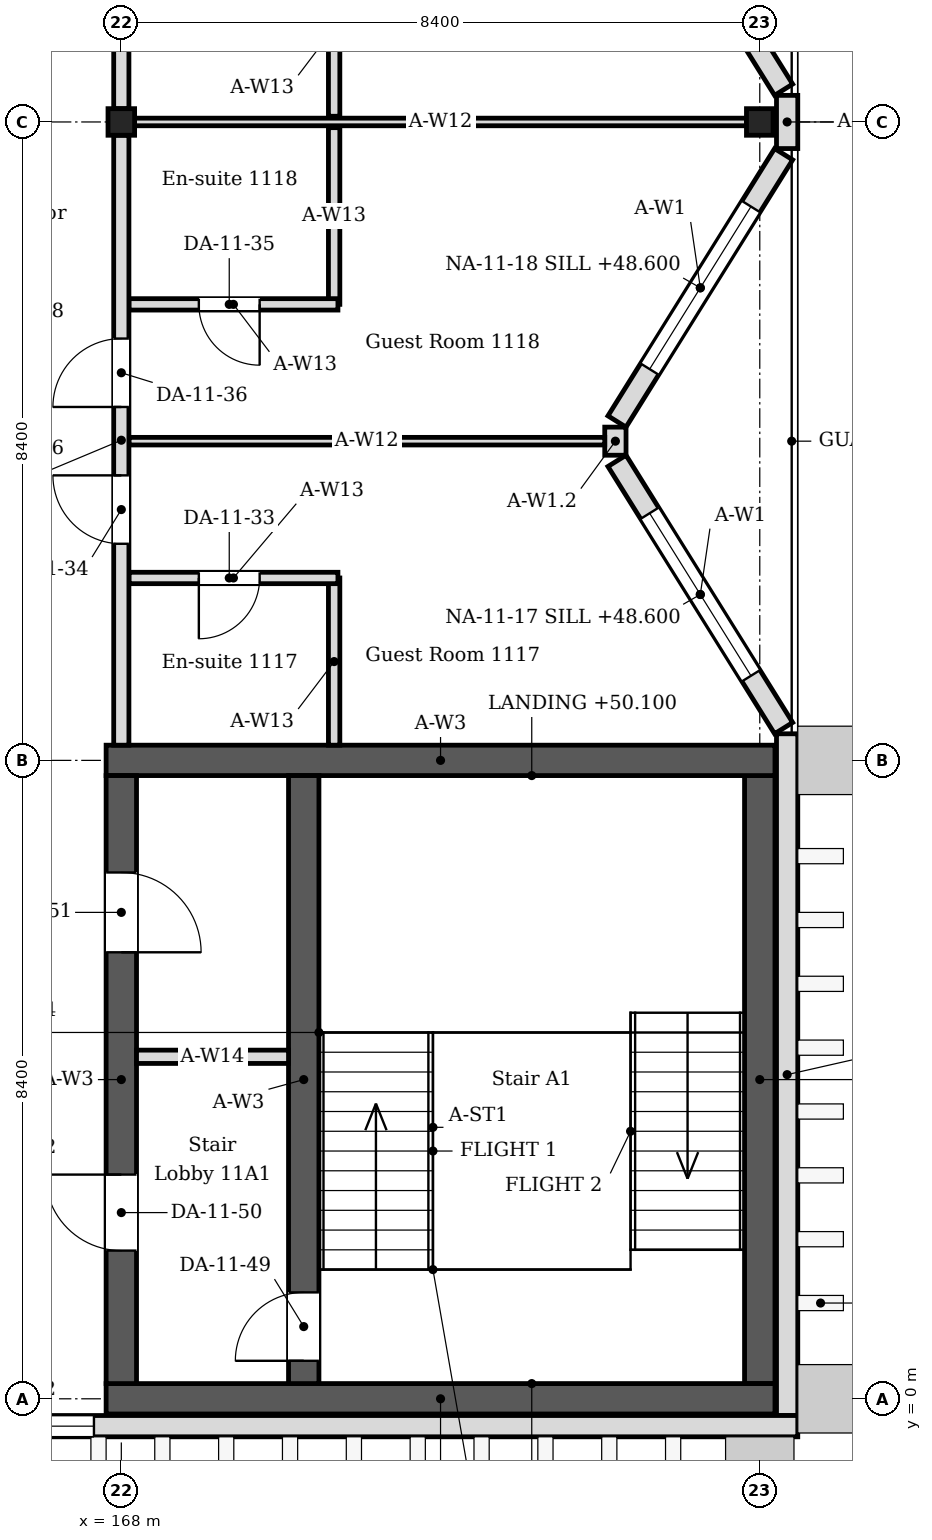
"""IFC4 building model, lengths in metres.
Left out: names, types, materials, properties, quantities, classifications, styles, units other than length and angle.
Written with IfcOpenShell. Run it as: python <this file> out.ifc"""

import sys

from ifc_helpers import new_model, si_unit, direction, frame, frame_2d, origin, origin_2d, place, context, subcontext, project, spatial, rectangle, i_section, extrude, element, fill, save


model = new_model("IFC4")
c1 = context("Model", 3, precision=1e-05, world=origin(), true_north=direction((0.0, 1.0)))
c2 = subcontext(c1, "Body", "Model", "MODEL_VIEW")
j1 = project(units=[si_unit("LENGTHUNIT", "METRE"), si_unit("PLANEANGLEUNIT", "RADIAN")], contexts=[c1])
p1 = place(None, origin())
s1 = spatial("IfcSite", under=j1, at=p1, CompositionType="ELEMENT")
p2 = place(p1, origin())
s2 = spatial("IfcBuilding", under=s1, at=p2, CompositionType="ELEMENT")
p3 = place(p2, frame((0.0, 0.0, 48.0)))
s3 = spatial("IfcBuildingStorey", under=s2, at=p3, CompositionType="ELEMENT", Elevation=48.0)
for number, where, z_axis, x_axis in (
    (1, (168.0, 16.8, 0.0), (0.0, 0.0, 1.0), (1.0, 0.0, 0.0)),
    (2, (176.4, 16.8, 0.0), (0.0, 0.0, 1.0), (1.0, 0.0, 0.0)),
):
    element("IfcColumn", number, at=place(p3, frame(where, z_axis=z_axis, x_axis=x_axis)), inside=s3, PredefinedType="COLUMN", context=c2, shape_type="SweptSolid", body=[
        extrude(i_section(OverallWidth=0.35, OverallDepth=0.35, WebThickness=0.012, FlangeThickness=0.019, FilletRadius=0.013, at=origin_2d()), origin(), (0.0, 0.0, 1.0), 4.2),
    ])
for number, where, z_axis, x_axis in (
    (3, (167.8, 0.0, 0.0), (0.0, 0.0, 1.0), (1.0, 0.0, 0.0)),
    (4, (167.8, 8.4, 0.0), (0.0, 0.0, 1.0), (1.0, 0.0, 0.0)),
):
    element("IfcWall", number, at=place(p3, frame(where, z_axis=z_axis, x_axis=x_axis)), inside=s3, PredefinedType="SOLIDWALL", context=c2, shape_type="SweptSolid", body=[
        extrude(rectangle(XDim=8.8, YDim=0.4, at=frame_2d((4.4, 0.0))), origin(), (0.0, 0.0, 1.0), 4.05),
    ])
p4 = place(p3, frame((168.0, 0.2, 0.0), z_axis=(0.0, 0.0, 1.0), x_axis=(0.0, 1.0, 0.0)))
e5 = element("IfcWall", 5, at=p4, inside=s3, PredefinedType="SOLIDWALL", context=c2, shape_type="SweptSolid", body=[
    extrude(rectangle(XDim=8.0, YDim=0.4, at=frame_2d((4.0, 0.0))), origin(), (0.0, 0.0, 1.0), 4.05),
])
p5 = place(p4, frame((1.75, 0.0, 0.0)))
e6 = element("IfcOpeningElement", 6, at=p5, cuts=e5, PredefinedType="OPENING", context=c2, shape_type="SweptSolid", body=[
    extrude(rectangle(XDim=1.0, YDim=2.1, at=frame_2d((0.5, 1.05))), frame((0.0, 0.21, 0.0), z_axis=(0.0, -1.0, 0.0), x_axis=(1.0, 0.0, 0.0)), (0.0, 0.0, 1.0), 0.42),
])
p6 = place(p4, frame((5.675, 0.0, 0.0)))
e7 = element("IfcOpeningElement", 7, at=p6, cuts=e5, PredefinedType="OPENING", context=c2, shape_type="SweptSolid", body=[
    extrude(rectangle(XDim=1.05, YDim=2.1, at=frame_2d((0.525, 1.05))), frame((0.0, 0.21, 0.0), z_axis=(0.0, -1.0, 0.0), x_axis=(1.0, 0.0, 0.0)), (0.0, 0.0, 1.0), 0.42),
])
p7 = place(p3, frame((176.4, 0.2, 0.0), z_axis=(0.0, 0.0, 1.0), x_axis=(0.0, 1.0, 0.0)))
e8 = element("IfcWall", 8, at=p7, inside=s3, PredefinedType="SOLIDWALL", context=c2, shape_type="SweptSolid", body=[
    extrude(rectangle(XDim=8.0, YDim=0.4, at=frame_2d((4.0, 0.0))), origin(), (0.0, 0.0, 1.0), 4.05),
])
p8 = place(p3, frame((176.76, -0.22, 0.0), z_axis=(0.0, 0.0, 1.0), x_axis=(0.0, 1.0, 0.0)))
e9 = element("IfcWall", 9, at=p8, inside=s3, PredefinedType="SOLIDWALL", context=c2, shape_type="SweptSolid", body=[
    extrude(rectangle(XDim=8.97, YDim=0.28, at=frame_2d((4.485, 0.0))), origin(), (0.0, 0.0, 1.0), 4.05),
])
p9 = place(p3, frame((176.714, 8.824, 0.0), z_axis=(0.0, 0.0, 1.0), x_axis=(-0.529018946142, 0.848610013271, 0.0)))
e10 = element("IfcWall", 10, at=p9, inside=s3, PredefinedType="SOLIDWALL", context=c2, shape_type="SweptSolid", body=[
    extrude(rectangle(XDim=4.144, YDim=0.28, at=frame_2d((2.072, 0.0))), origin(), (0.0, 0.0, 1.0), 4.05),
])
p10 = place(p9, frame((0.812, 0.0, 0.6)))
e11 = element("IfcOpeningElement", 11, at=p10, cuts=e10, PredefinedType="OPENING", context=c2, shape_type="SweptSolid", body=[
    extrude(rectangle(XDim=2.52, YDim=2.4, at=frame_2d((1.26, 1.2))), frame((0.0, 0.15, 0.0), z_axis=(0.0, -1.0, 0.0), x_axis=(1.0, 0.0, 0.0)), (0.0, 0.0, 1.0), 0.3),
])
p11 = place(p3, frame((174.521, 12.859, 0.0), z_axis=(0.0, 0.0, 1.0), x_axis=(0.528992500338, 0.848626498871, 0.0)))
e12 = element("IfcWall", 12, at=p11, inside=s3, PredefinedType="SOLIDWALL", context=c2, shape_type="SweptSolid", body=[
    extrude(rectangle(XDim=4.145, YDim=0.28, at=frame_2d((2.072, 0.0))), origin(), (0.0, 0.0, 1.0), 4.05),
])
p12 = place(p11, frame((0.812, 0.0, 0.6)))
e13 = element("IfcOpeningElement", 13, at=p12, cuts=e12, PredefinedType="OPENING", context=c2, shape_type="SweptSolid", body=[
    extrude(rectangle(XDim=2.52, YDim=2.4, at=frame_2d((1.26, 1.2))), frame((0.0, 0.15, 0.0), z_axis=(0.0, -1.0, 0.0), x_axis=(1.0, 0.0, 0.0)), (0.0, 0.0, 1.0), 0.3),
])
p13 = place(p3, frame((174.5, 12.415, 0.0), z_axis=(0.0, 0.0, 1.0), x_axis=(0.0, 1.0, 0.0)))
e14 = element("IfcWall", 14, at=p13, inside=s3, PredefinedType="SOLIDWALL", context=c2, shape_type="SweptSolid", body=[
    extrude(rectangle(XDim=0.37, YDim=0.28, at=frame_2d((0.185, 0.0))), origin(), (0.0, 0.0, 1.0), 3.604),
])
p14 = place(p3, frame((176.76, 16.45, 0.0), z_axis=(0.0, 0.0, 1.0), x_axis=(0.0, 1.0, 0.0)))
e15 = element("IfcWall", 15, at=p14, inside=s3, PredefinedType="SOLIDWALL", context=c2, shape_type="SweptSolid", body=[
    extrude(rectangle(XDim=0.7, YDim=0.28, at=frame_2d((0.35, 0.0))), origin(), (0.0, 0.0, 1.0), 4.05),
])
p15 = place(p3, frame((176.714, 17.224, 0.0), z_axis=(0.0, 0.0, 1.0), x_axis=(-0.529018946142, 0.848610013271, 0.0)))
e16 = element("IfcWall", 16, at=p15, inside=s3, PredefinedType="SOLIDWALL", context=c2, shape_type="SweptSolid", body=[
    extrude(rectangle(XDim=4.144, YDim=0.28, at=frame_2d((2.072, 0.0))), origin(), (0.0, 0.0, 1.0), 4.05),
])
p16 = place(p15, frame((0.812, 0.0, 0.6)))
e17 = element("IfcOpeningElement", 17, at=p16, cuts=e16, PredefinedType="OPENING", context=c2, shape_type="SweptSolid", body=[
    extrude(rectangle(XDim=2.52, YDim=2.4, at=frame_2d((1.26, 1.2))), frame((0.0, 0.15, 0.0), z_axis=(0.0, -1.0, 0.0), x_axis=(1.0, 0.0, 0.0)), (0.0, 0.0, 1.0), 0.3),
])
p17 = place(p3, frame((156.7, -0.36, 0.0), z_axis=(0.0, 0.0, 1.0), x_axis=(1.0, 0.0, 0.0)))
e18 = element("IfcWall", 18, at=p17, inside=s3, PredefinedType="SOLIDWALL", context=c2, shape_type="SweptSolid", body=[
    extrude(rectangle(XDim=20.2, YDim=0.28, at=frame_2d((10.1, 0.0))), origin(), (0.0, 0.0, 1.0), 4.05),
])
p18 = place(p17, frame((9.26, 0.0, 0.6)))
e19 = element("IfcOpeningElement", 19, at=p18, cuts=e18, PredefinedType="OPENING", context=c2, shape_type="SweptSolid", body=[
    extrude(rectangle(XDim=1.68, YDim=2.4, at=frame_2d((0.84, 1.2))), frame((0.0, 0.15, 0.0), z_axis=(0.0, -1.0, 0.0), x_axis=(1.0, 0.0, 0.0)), (0.0, 0.0, 1.0), 0.3),
])
p19 = place(p17, frame((3.34, 0.0, 0.6)))
e20 = element("IfcOpeningElement", 20, at=p19, cuts=e18, PredefinedType="OPENING", context=c2, shape_type="SweptSolid", body=[
    extrude(rectangle(XDim=2.52, YDim=2.4, at=frame_2d((1.26, 1.2))), frame((0.0, 0.15, 0.0), z_axis=(0.0, -1.0, 0.0), x_axis=(1.0, 0.0, 0.0)), (0.0, 0.0, 1.0), 0.3),
])
p20 = place(p3, frame((170.8, 8.6, 0.0), z_axis=(0.0, 0.0, 1.0), x_axis=(0.0, 1.0, 0.0)))
e21 = element("IfcWall", 21, at=p20, inside=s3, PredefinedType="PARTITIONING", context=c2, shape_type="SweptSolid", body=[
    extrude(rectangle(XDim=2.2, YDim=0.15, at=frame_2d((1.1, 0.0))), origin(), (0.0, 0.0, 1.0), 4.05),
])
p21 = place(p3, frame((170.85, 10.8, 0.0), z_axis=(0.0, 0.0, 1.0), x_axis=(-1.0, 0.0, 0.0)))
e22 = element("IfcWall", 22, at=p21, inside=s3, PredefinedType="PARTITIONING", context=c2, shape_type="SweptSolid", body=[
    extrude(rectangle(XDim=2.75, YDim=0.15, at=frame_2d((1.375, 0.0))), origin(), (0.0, 0.0, 1.0), 4.05),
])
p22 = place(p21, frame((1.03, 0.0, 0.0)))
e23 = element("IfcOpeningElement", 23, at=p22, cuts=e22, PredefinedType="OPENING", context=c2, shape_type="SweptSolid", body=[
    extrude(rectangle(XDim=0.8, YDim=2.1, at=frame_2d((0.4, 1.05))), frame((0.0, 0.085, 0.0), z_axis=(0.0, -1.0, 0.0), x_axis=(1.0, 0.0, 0.0)), (0.0, 0.0, 1.0), 0.17),
])
p23 = place(p3, frame((170.8, 14.4, 0.0), z_axis=(0.0, 0.0, 1.0), x_axis=(0.0, 1.0, 0.0)))
e24 = element("IfcWall", 24, at=p23, inside=s3, PredefinedType="PARTITIONING", context=c2, shape_type="SweptSolid", body=[
    extrude(rectangle(XDim=2.325, YDim=0.15, at=frame_2d((1.163, 0.0))), origin(), (0.0, 0.0, 1.0), 4.05),
])
p24 = place(p3, frame((170.85, 14.4, 0.0), z_axis=(0.0, 0.0, 1.0), x_axis=(-1.0, 0.0, 0.0)))
e25 = element("IfcWall", 25, at=p24, inside=s3, PredefinedType="PARTITIONING", context=c2, shape_type="SweptSolid", body=[
    extrude(rectangle(XDim=2.75, YDim=0.15, at=frame_2d((1.375, 0.0))), origin(), (0.0, 0.0, 1.0), 4.05),
])
p25 = place(p24, frame((1.03, 0.0, 0.0)))
e26 = element("IfcOpeningElement", 26, at=p25, cuts=e25, PredefinedType="OPENING", context=c2, shape_type="SweptSolid", body=[
    extrude(rectangle(XDim=0.8, YDim=2.1, at=frame_2d((0.4, 1.05))), frame((0.0, 0.085, 0.0), z_axis=(0.0, -1.0, 0.0), x_axis=(1.0, 0.0, 0.0)), (0.0, 0.0, 1.0), 0.17),
])
p26 = place(p3, frame((170.8, 16.875, 0.0), z_axis=(0.0, 0.0, 1.0), x_axis=(0.0, 1.0, 0.0)))
e27 = element("IfcWall", 27, at=p26, inside=s3, PredefinedType="PARTITIONING", context=c2, shape_type="SweptSolid", body=[
    extrude(rectangle(XDim=2.325, YDim=0.15, at=frame_2d((1.163, 0.0))), origin(), (0.0, 0.0, 1.0), 4.05),
])
p27 = place(p3, frame((168.175, 16.8, 0.0), z_axis=(0.0, 0.0, 1.0), x_axis=(1.0, 0.0, 0.0)))
e28 = element("IfcWall", 28, at=p27, inside=s3, PredefinedType="PARTITIONING", context=c2, shape_type="SweptSolid", body=[
    extrude(rectangle(XDim=8.05, YDim=0.1, at=frame_2d((4.025, 0.0))), origin(), (0.0, 0.0, 1.0), 3.604),
])
p28 = place(p3, frame((168.1, 12.6, 0.0), z_axis=(0.0, 0.0, 1.0), x_axis=(1.0, 0.0, 0.0)))
e29 = element("IfcWall", 29, at=p28, inside=s3, PredefinedType="PARTITIONING", context=c2, shape_type="SweptSolid", body=[
    extrude(rectangle(XDim=6.26, YDim=0.1, at=frame_2d((3.13, 0.0))), origin(), (0.0, 0.0, 1.0), 3.604),
])
p29 = place(p3, frame((168.0, 8.6, 0.0), z_axis=(0.0, 0.0, 1.0), x_axis=(0.0, 1.0, 0.0)))
e30 = element("IfcWall", 30, at=p29, inside=s3, PredefinedType="PARTITIONING", context=c2, shape_type="SweptSolid", body=[
    extrude(rectangle(XDim=8.025, YDim=0.2, at=frame_2d((4.012, 0.0))), origin(), (0.0, 0.0, 1.0), 3.45),
])
p30 = place(p29, frame((2.65, 0.0, 0.0)))
e31 = element("IfcOpeningElement", 31, at=p30, cuts=e30, PredefinedType="OPENING", context=c2, shape_type="SweptSolid", body=[
    extrude(rectangle(XDim=0.9, YDim=2.1, at=frame_2d((0.45, 1.05))), frame((0.0, 0.11, 0.0), z_axis=(0.0, -1.0, 0.0), x_axis=(1.0, 0.0, 0.0)), (0.0, 0.0, 1.0), 0.22),
])
p31 = place(p29, frame((4.45, 0.0, 0.0)))
e32 = element("IfcOpeningElement", 32, at=p31, cuts=e30, PredefinedType="OPENING", context=c2, shape_type="SweptSolid", body=[
    extrude(rectangle(XDim=0.9, YDim=2.1, at=frame_2d((0.45, 1.05))), frame((0.0, 0.11, 0.0), z_axis=(0.0, -1.0, 0.0), x_axis=(1.0, 0.0, 0.0)), (0.0, 0.0, 1.0), 0.22),
])
p32 = place(p3, frame((168.0, 16.975, 0.0), z_axis=(0.0, 0.0, 1.0), x_axis=(0.0, 1.0, 0.0)))
e33 = element("IfcWall", 33, at=p32, inside=s3, PredefinedType="PARTITIONING", context=c2, shape_type="SweptSolid", body=[
    extrude(rectangle(XDim=7.975, YDim=0.2, at=frame_2d((3.987, 0.0))), origin(), (0.0, 0.0, 1.0), 3.45),
])
p33 = place(p32, frame((2.675, 0.0, 0.0)))
e34 = element("IfcOpeningElement", 34, at=p33, cuts=e33, PredefinedType="OPENING", context=c2, shape_type="SweptSolid", body=[
    extrude(rectangle(XDim=0.9, YDim=2.1, at=frame_2d((0.45, 1.05))), frame((0.0, 0.11, 0.0), z_axis=(0.0, -1.0, 0.0), x_axis=(1.0, 0.0, 0.0)), (0.0, 0.0, 1.0), 0.22),
])
p34 = place(p32, frame((4.475, 0.0, 0.0)))
e35 = element("IfcOpeningElement", 35, at=p34, cuts=e33, PredefinedType="OPENING", context=c2, shape_type="SweptSolid", body=[
    extrude(rectangle(XDim=0.9, YDim=2.1, at=frame_2d((0.45, 1.05))), frame((0.0, 0.11, 0.0), z_axis=(0.0, -1.0, 0.0), x_axis=(1.0, 0.0, 0.0)), (0.0, 0.0, 1.0), 0.22),
])
p35 = place(p3, frame((170.4, 0.2, 0.0), z_axis=(0.0, 0.0, 1.0), x_axis=(0.0, 1.0, 0.0)))
e36 = element("IfcWall", 36, at=p35, inside=s3, PredefinedType="SOLIDWALL", context=c2, shape_type="SweptSolid", body=[
    extrude(rectangle(XDim=8.0, YDim=0.4, at=frame_2d((4.0, 0.0))), origin(), (0.0, 0.0, 1.0), 4.05),
])
p36 = place(p35, frame((0.3, 0.0, 0.0)))
e37 = element("IfcOpeningElement", 37, at=p36, cuts=e36, PredefinedType="OPENING", context=c2, shape_type="SweptSolid", body=[
    extrude(rectangle(XDim=0.9, YDim=2.1, at=frame_2d((0.45, 1.05))), frame((0.0, 0.21, 0.0), z_axis=(0.0, -1.0, 0.0), x_axis=(1.0, 0.0, 0.0)), (0.0, 0.0, 1.0), 0.42),
])
p37 = place(p3, frame((168.2, 4.5, 0.0), z_axis=(0.0, 0.0, 1.0), x_axis=(1.0, 0.0, 0.0)))
e38 = element("IfcWall", 38, at=p37, inside=s3, PredefinedType="PARTITIONING", context=c2, shape_type="SweptSolid", body=[
    extrude(rectangle(XDim=2.0, YDim=0.175, at=frame_2d((1.0, 0.0))), origin(), (0.0, 0.0, 1.0), 4.05),
])
p38 = place(p10, origin())
e39 = element("IfcWindow", 39, at=p38, inside=s3, PartitioningType="SINGLE_PANEL", PredefinedType="WINDOW", context=c2, shape_type="SweptSolid", body=[
    extrude(rectangle(XDim=2.52, YDim=2.4, at=frame_2d((1.26, 1.2))), frame((0.0, 0.03, 0.0), z_axis=(0.0, -1.0, 0.0), x_axis=(1.0, 0.0, 0.0)), (0.0, 0.0, 1.0), 0.06),
])
fill(e11, e39)
p39 = place(p12, origin())
e40 = element("IfcWindow", 40, at=p39, inside=s3, PartitioningType="SINGLE_PANEL", PredefinedType="WINDOW", context=c2, shape_type="SweptSolid", body=[
    extrude(rectangle(XDim=2.52, YDim=2.4, at=frame_2d((1.26, 1.2))), frame((0.0, 0.03, 0.0), z_axis=(0.0, -1.0, 0.0), x_axis=(1.0, 0.0, 0.0)), (0.0, 0.0, 1.0), 0.06),
])
fill(e13, e40)
p40 = place(p18, origin())
e41 = element("IfcWindow", 41, at=p40, inside=s3, PartitioningType="SINGLE_PANEL", PredefinedType="WINDOW", context=c2, shape_type="SweptSolid", body=[
    extrude(rectangle(XDim=1.68, YDim=2.4, at=frame_2d((0.84, 1.2))), frame((0.0, 0.03, 0.0), z_axis=(0.0, -1.0, 0.0), x_axis=(1.0, 0.0, 0.0)), (0.0, 0.0, 1.0), 0.06),
])
fill(e19, e41)
p41 = place(p22, origin())
e42 = element("IfcDoor", 42, at=p41, inside=s3, OperationType="SINGLE_SWING_RIGHT", PredefinedType="DOOR", context=c2, shape_type="SweptSolid", body=[
    extrude(rectangle(XDim=0.8, YDim=2.1, at=frame_2d((0.4, 1.05))), frame((0.0, 0.025, 0.0), z_axis=(0.0, -1.0, 0.0), x_axis=(1.0, 0.0, 0.0)), (0.0, 0.0, 1.0), 0.05),
])
fill(e23, e42)
p42 = place(p30, origin())
e43 = element("IfcDoor", 43, at=p42, inside=s3, OperationType="SINGLE_SWING_RIGHT", PredefinedType="DOOR", context=c2, shape_type="SweptSolid", body=[
    extrude(rectangle(XDim=0.9, YDim=2.1, at=frame_2d((0.45, 1.05))), frame((0.0, 0.025, 0.0), z_axis=(0.0, -1.0, 0.0), x_axis=(1.0, 0.0, 0.0)), (0.0, 0.0, 1.0), 0.05),
])
fill(e31, e43)
p43 = place(p25, origin())
e44 = element("IfcDoor", 44, at=p43, inside=s3, OperationType="SINGLE_SWING_LEFT", PredefinedType="DOOR", context=c2, shape_type="SweptSolid", body=[
    extrude(rectangle(XDim=0.8, YDim=2.1, at=frame_2d((0.4, 1.05))), frame((0.0, 0.025, 0.0), z_axis=(0.0, -1.0, 0.0), x_axis=(1.0, 0.0, 0.0)), (0.0, 0.0, 1.0), 0.05),
])
fill(e26, e44)
p44 = place(p31, origin())
e45 = element("IfcDoor", 45, at=p44, inside=s3, OperationType="SINGLE_SWING_LEFT", PredefinedType="DOOR", context=c2, shape_type="SweptSolid", body=[
    extrude(rectangle(XDim=0.9, YDim=2.1, at=frame_2d((0.45, 1.05))), frame((0.0, 0.025, 0.0), z_axis=(0.0, -1.0, 0.0), x_axis=(1.0, 0.0, 0.0)), (0.0, 0.0, 1.0), 0.05),
])
fill(e32, e45)
p45 = place(p36, origin())
e46 = element("IfcDoor", 46, at=p45, inside=s3, OperationType="SINGLE_SWING_LEFT", PredefinedType="DOOR", context=c2, shape_type="SweptSolid", body=[
    extrude(rectangle(XDim=0.9, YDim=2.1, at=frame_2d((0.45, 1.05))), frame((0.0, 0.025, 0.0), z_axis=(0.0, -1.0, 0.0), x_axis=(1.0, 0.0, 0.0)), (0.0, 0.0, 1.0), 0.05),
])
fill(e37, e46)
p46 = place(p5, origin())
e47 = element("IfcDoor", 47, at=p46, inside=s3, OperationType="SINGLE_SWING_RIGHT", PredefinedType="DOOR", context=c2, shape_type="SweptSolid", body=[
    extrude(rectangle(XDim=1.0, YDim=2.1, at=frame_2d((0.5, 1.05))), frame((0.0, 0.025, 0.0), z_axis=(0.0, -1.0, 0.0), x_axis=(1.0, 0.0, 0.0)), (0.0, 0.0, 1.0), 0.05),
])
fill(e6, e47)
p47 = place(p6, origin())
e48 = element("IfcDoor", 48, at=p47, inside=s3, OperationType="SINGLE_SWING_LEFT", PredefinedType="DOOR", context=c2, shape_type="SweptSolid", body=[
    extrude(rectangle(XDim=1.05, YDim=2.1, at=frame_2d((0.525, 1.05))), frame((0.0, 0.025, 0.0), z_axis=(0.0, -1.0, 0.0), x_axis=(1.0, 0.0, 0.0)), (0.0, 0.0, 1.0), 0.05),
])
fill(e7, e48)
save(model, sys.argv[1])
